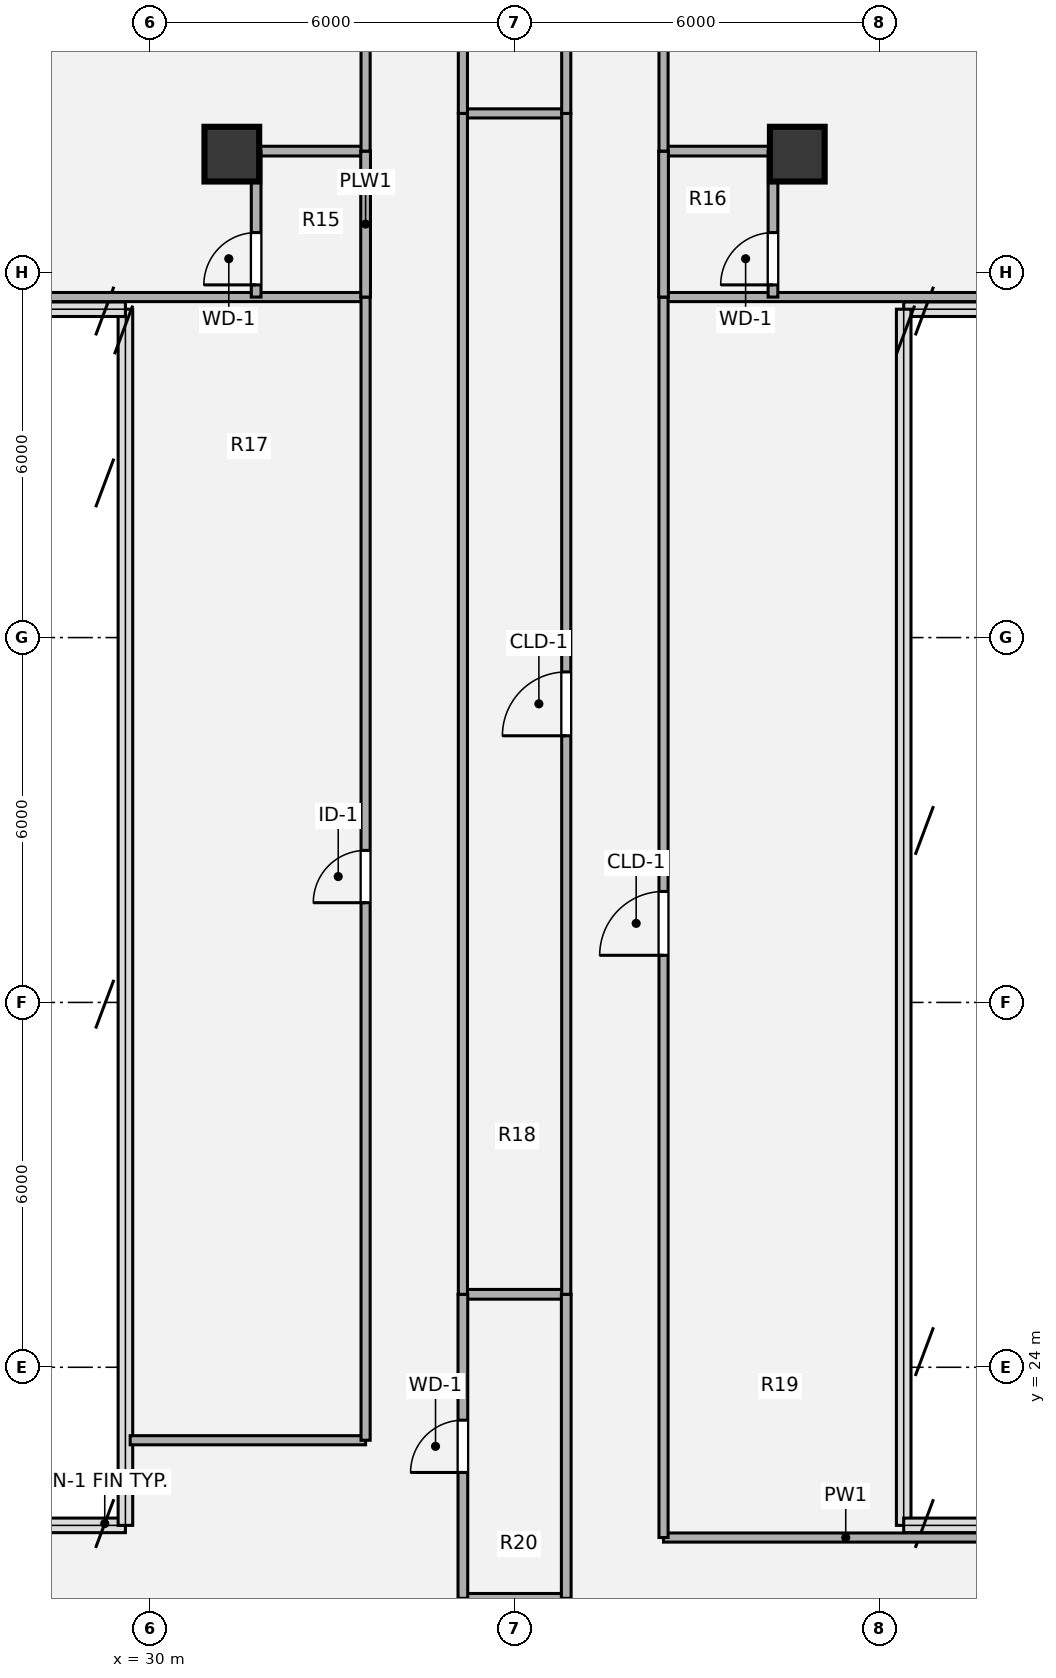
"""IFC4 building model, lengths in metres.
Left out: names, types, materials, properties, quantities, classifications, styles, units other than length and angle.
Written with IfcOpenShell. Run it as: python <this file> out.ifc"""

import sys

from ifc_helpers import new_model, si_unit, direction, frame, frame_2d, origin, origin_2d, place, context, subcontext, project, spatial, rectangle, hollow_circle, extrude, source, transform, mapped, element, fill, save


model = new_model("IFC4")
c1 = context("Model", 3, precision=1e-05, world=origin(), true_north=direction((0.0, 1.0)))
c2 = subcontext(c1, "Body", "Model", "MODEL_VIEW")
j1 = project(units=[si_unit("LENGTHUNIT", "METRE"), si_unit("PLANEANGLEUNIT", "RADIAN")], contexts=[c1])
p1 = place(None, origin())
s1 = spatial("IfcSite", under=j1, at=p1, CompositionType="ELEMENT")
p2 = place(p1, origin())
s2 = spatial("IfcBuilding", under=s1, at=p2, CompositionType="ELEMENT")
p3 = place(p2, frame((0.0, 0.0, 272.16)))
s3 = spatial("IfcBuildingStorey", under=s2, at=p3, CompositionType="ELEMENT", Elevation=272.16)
m1 = source(origin(), c2, "Body", "SweptSolid", [
    extrude(hollow_circle(Radius=0.45, WallThickness=0.032, at=origin_2d()), origin(), (0.0, 0.0, 1.0), 3.78),
])
for number, where, z_axis, x_axis in (
    (1, (31.35, 43.95, 0.0), (0.0, 0.0, 1.0), (1.0, 0.0, 0.0)),
    (2, (40.65, 43.95, 0.0), (0.0, 0.0, 1.0), (1.0, 0.0, 0.0)),
):
    element("IfcColumn", number, at=place(p3, frame(where, z_axis=z_axis, x_axis=x_axis)), inside=s3, PredefinedType="COLUMN", context=c2, shape_type="MappedRepresentation", body=[
        mapped(m1, transform((0.0, 0.0, 0.0), x_axis=(1.0, 0.0, 0.0), y_axis=(0.0, 1.0, 0.0), z_axis=(0.0, 0.0, 1.0), scale=1.0)),
    ])
p4 = place(p3, frame((35.15, 20.2, 0.0), z_axis=(0.0, 0.0, 1.0), x_axis=(1.0, 0.0, 0.0)))
e3 = element("IfcWall", 3, at=p4, inside=s3, PredefinedType="PLUMBINGWALL", context=c2, shape_type="SweptSolid", body=[
    extrude(rectangle(XDim=1.7, YDim=0.16, at=frame_2d((0.85, 0.0))), origin(), (0.0, 0.0, 1.0), 3.5),
])
p5 = place(p3, frame((38.45, 21.2, 0.0), z_axis=(0.0, 0.0, 1.0), x_axis=(1.0, 0.0, 0.0)))
e4 = element("IfcWall", 4, at=p5, inside=s3, PredefinedType="PARTITIONING", context=c2, shape_type="SweptSolid", body=[
    extrude(rectangle(XDim=5.993, YDim=0.15, at=frame_2d((2.997, 0.0))), origin(), (0.0, 0.0, 1.0), 3.5),
])
p6 = place(p3, frame((29.678, 22.8, 0.0), z_axis=(0.0, 0.0, 1.0), x_axis=(1.0, 0.0, 0.0)))
e5 = element("IfcWall", 5, at=p6, inside=s3, PredefinedType="PARTITIONING", context=c2, shape_type="SweptSolid", body=[
    extrude(rectangle(XDim=3.872, YDim=0.15, at=frame_2d((1.936, 0.0))), origin(), (0.0, 0.0, 1.0), 3.5),
])
p7 = place(p3, frame((35.15, 25.2, 0.0), z_axis=(0.0, 0.0, 1.0), x_axis=(1.0, 0.0, 0.0)))
e6 = element("IfcWall", 6, at=p7, inside=s3, PredefinedType="PLUMBINGWALL", context=c2, shape_type="SweptSolid", body=[
    extrude(rectangle(XDim=1.7, YDim=0.16, at=frame_2d((0.85, 0.0))), origin(), (0.0, 0.0, 1.0), 3.5),
])
p8 = place(p3, frame((27.558, 41.6, 0.0), z_axis=(0.0, 0.0, 1.0), x_axis=(1.0, 0.0, 0.0)))
e7 = element("IfcWall", 7, at=p8, inside=s3, PredefinedType="PARTITIONING", context=c2, shape_type="SweptSolid", body=[
    extrude(rectangle(XDim=5.992, YDim=0.15, at=frame_2d((2.996, 0.0))), origin(), (0.0, 0.0, 1.0), 3.5),
])
p9 = place(p3, frame((38.45, 41.6, 0.0), z_axis=(0.0, 0.0, 1.0), x_axis=(1.0, 0.0, 0.0)))
e8 = element("IfcWall", 8, at=p9, inside=s3, PredefinedType="PARTITIONING", context=c2, shape_type="SweptSolid", body=[
    extrude(rectangle(XDim=5.993, YDim=0.15, at=frame_2d((2.997, 0.0))), origin(), (0.0, 0.0, 1.0), 3.5),
])
for number, where, z_axis, x_axis in (
    (9, (31.75, 44.0, 0.0), (0.0, 0.0, 1.0), (1.0, 0.0, 0.0)),
    (10, (38.45, 44.0, 0.0), (0.0, 0.0, 1.0), (1.0, 0.0, 0.0)),
):
    element("IfcWall", number, at=place(p3, frame(where, z_axis=z_axis, x_axis=x_axis)), inside=s3, PredefinedType="PLUMBINGWALL", context=c2, shape_type="SweptSolid", body=[
        extrude(rectangle(XDim=1.8, YDim=0.16, at=frame_2d((0.9, 0.0))), origin(), (0.0, 0.0, 1.0), 2.903),
    ])
p10 = place(p3, frame((35.15, 44.62, 0.0), z_axis=(0.0, 0.0, 1.0), x_axis=(1.0, 0.0, 0.0)))
e11 = element("IfcWall", 11, at=p10, inside=s3, PredefinedType="PARTITIONING", context=c2, shape_type="SweptSolid", body=[
    extrude(rectangle(XDim=1.7, YDim=0.15, at=frame_2d((0.85, 0.0))), origin(), (0.0, 0.0, 1.0), 3.259),
])
p11 = place(p3, frame((31.75, 41.6, 0.0), z_axis=(0.0, 0.0, 1.0), x_axis=(0.0, 1.0, 0.0)))
e12 = element("IfcWall", 12, at=p11, inside=s3, PredefinedType="PLUMBINGWALL", context=c2, shape_type="SweptSolid", body=[
    extrude(rectangle(XDim=2.4, YDim=0.16, at=frame_2d((1.2, 0.0))), origin(), (0.0, 0.0, 1.0), 3.5),
])
p12 = place(p11, frame((0.2, 0.0, 0.0)))
e13 = element("IfcOpeningElement", 13, at=p12, cuts=e12, PredefinedType="OPENING", context=c2, shape_type="SweptSolid", body=[
    extrude(rectangle(XDim=0.86, YDim=2.1, at=origin_2d()), frame((0.43, 0.09, 1.05), z_axis=(0.0, -1.0, 0.0), x_axis=(1.0, 0.0, 0.0)), (0.0, 0.0, 1.0), 0.18),
])
p13 = place(p3, frame((33.55, 22.8, 0.0), z_axis=(0.0, 0.0, 1.0), x_axis=(0.0, 1.0, 0.0)))
e14 = element("IfcWall", 14, at=p13, inside=s3, PredefinedType="PARTITIONING", context=c2, shape_type="SweptSolid", body=[
    extrude(rectangle(XDim=18.8, YDim=0.15, at=frame_2d((9.4, 0.0))), origin(), (0.0, 0.0, 1.0), 3.5),
])
p14 = place(p13, frame((8.84, 0.0, 0.0)))
e15 = element("IfcOpeningElement", 15, at=p14, cuts=e14, PredefinedType="OPENING", context=c2, shape_type="SweptSolid", body=[
    extrude(rectangle(XDim=0.86, YDim=2.1, at=origin_2d()), frame((0.43, 0.085, 1.05), z_axis=(0.0, -1.0, 0.0), x_axis=(1.0, 0.0, 0.0)), (0.0, 0.0, 1.0), 0.17),
])
p15 = place(p3, frame((33.55, 41.6, 0.0), z_axis=(0.0, 0.0, 1.0), x_axis=(0.0, 1.0, 0.0)))
e16 = element("IfcWall", 16, at=p15, inside=s3, PredefinedType="PLUMBINGWALL", context=c2, shape_type="SweptSolid", body=[
    extrude(rectangle(XDim=2.4, YDim=0.16, at=frame_2d((1.2, 0.0))), origin(), (0.0, 0.0, 1.0), 3.5),
])
p16 = place(p3, frame((33.55, 44.0, 0.0), z_axis=(0.0, 0.0, 1.0), x_axis=(0.0, 1.0, 0.0)))
e17 = element("IfcWall", 17, at=p16, inside=s3, PredefinedType="PARTITIONING", context=c2, shape_type="SweptSolid", body=[
    extrude(rectangle(XDim=5.64, YDim=0.15, at=frame_2d((2.82, 0.0))), origin(), (0.0, 0.0, 1.0), 3.5),
])
p17 = place(p16, frame((2.36, 0.0, 0.0)))
e18 = element("IfcOpeningElement", 18, at=p17, cuts=e17, PredefinedType="OPENING", context=c2, shape_type="SweptSolid", body=[
    extrude(rectangle(XDim=0.92, YDim=2.1, at=origin_2d()), frame((0.46, 0.085, 1.05), z_axis=(0.0, -1.0, 0.0), x_axis=(1.0, 0.0, 0.0)), (0.0, 0.0, 1.0), 0.17),
])
p18 = place(p3, frame((35.15, 20.2, 0.0), z_axis=(0.0, 0.0, 1.0), x_axis=(0.0, 1.0, 0.0)))
e19 = element("IfcWall", 19, at=p18, inside=s3, PredefinedType="PLUMBINGWALL", context=c2, shape_type="SweptSolid", body=[
    extrude(rectangle(XDim=5.0, YDim=0.16, at=frame_2d((2.5, 0.0))), origin(), (0.0, 0.0, 1.0), 3.5),
])
p19 = place(p18, frame((2.07, 0.0, 0.0)))
e20 = element("IfcOpeningElement", 20, at=p19, cuts=e19, PredefinedType="OPENING", context=c2, shape_type="SweptSolid", body=[
    extrude(rectangle(XDim=0.86, YDim=2.1, at=origin_2d()), frame((0.43, 0.09, 1.05), z_axis=(0.0, -1.0, 0.0), x_axis=(1.0, 0.0, 0.0)), (0.0, 0.0, 1.0), 0.18),
])
p20 = place(p3, frame((35.15, 25.2, 0.0), z_axis=(0.0, 0.0, 1.0), x_axis=(0.0, 1.0, 0.0)))
e21 = element("IfcWall", 21, at=p20, inside=s3, PredefinedType="PARTITIONING", context=c2, shape_type="SweptSolid", body=[
    extrude(rectangle(XDim=19.42, YDim=0.15, at=frame_2d((9.71, 0.0))), origin(), (0.0, 0.0, 1.0), 3.5),
])
p21 = place(p3, frame((35.15, 44.62, 0.0), z_axis=(0.0, 0.0, 1.0), x_axis=(0.0, 1.0, 0.0)))
e22 = element("IfcWall", 22, at=p21, inside=s3, PredefinedType="PARTITIONING", context=c2, shape_type="SweptSolid", body=[
    extrude(rectangle(XDim=12.58, YDim=0.15, at=frame_2d((6.29, 0.0))), origin(), (0.0, 0.0, 1.0), 3.5),
])
p22 = place(p21, frame((5.83, 0.0, 0.0)))
e23 = element("IfcOpeningElement", 23, at=p22, cuts=e22, PredefinedType="OPENING", context=c2, shape_type="SweptSolid", body=[
    extrude(rectangle(XDim=0.86, YDim=2.1, at=origin_2d()), frame((0.43, 0.085, 1.05), z_axis=(0.0, -1.0, 0.0), x_axis=(1.0, 0.0, 0.0)), (0.0, 0.0, 1.0), 0.17),
])
p23 = place(p3, frame((36.85, 20.2, 0.0), z_axis=(0.0, 0.0, 1.0), x_axis=(0.0, 1.0, 0.0)))
e24 = element("IfcWall", 24, at=p23, inside=s3, PredefinedType="PLUMBINGWALL", context=c2, shape_type="SweptSolid", body=[
    extrude(rectangle(XDim=5.0, YDim=0.16, at=frame_2d((2.5, 0.0))), origin(), (0.0, 0.0, 1.0), 3.5),
])
p24 = place(p3, frame((36.85, 25.2, 0.0), z_axis=(0.0, 0.0, 1.0), x_axis=(0.0, 1.0, 0.0)))
e25 = element("IfcWall", 25, at=p24, inside=s3, PredefinedType="PARTITIONING", context=c2, shape_type="SweptSolid", body=[
    extrude(rectangle(XDim=19.42, YDim=0.15, at=frame_2d((9.71, 0.0))), origin(), (0.0, 0.0, 1.0), 3.5),
])
p25 = place(p24, frame((9.185, 0.0, 0.0)))
e26 = element("IfcOpeningElement", 26, at=p25, cuts=e25, PredefinedType="OPENING", context=c2, shape_type="SweptSolid", body=[
    extrude(rectangle(XDim=1.05, YDim=2.1, at=origin_2d()), frame((0.525, 0.085, 1.05), z_axis=(0.0, -1.0, 0.0), x_axis=(1.0, 0.0, 0.0)), (0.0, 0.0, 1.0), 0.17),
])
p26 = place(p3, frame((36.85, 44.62, 0.0), z_axis=(0.0, 0.0, 1.0), x_axis=(0.0, 1.0, 0.0)))
e27 = element("IfcWall", 27, at=p26, inside=s3, PredefinedType="PARTITIONING", context=c2, shape_type="SweptSolid", body=[
    extrude(rectangle(XDim=12.58, YDim=0.15, at=frame_2d((6.29, 0.0))), origin(), (0.0, 0.0, 1.0), 3.5),
])
p27 = place(p3, frame((38.45, 21.2, 0.0), z_axis=(0.0, 0.0, 1.0), x_axis=(0.0, 1.0, 0.0)))
e28 = element("IfcWall", 28, at=p27, inside=s3, PredefinedType="PARTITIONING", context=c2, shape_type="SweptSolid", body=[
    extrude(rectangle(XDim=20.4, YDim=0.15, at=frame_2d((10.2, 0.0))), origin(), (0.0, 0.0, 1.0), 3.5),
])
p28 = place(p27, frame((9.575, 0.0, 0.0)))
e29 = element("IfcOpeningElement", 29, at=p28, cuts=e28, PredefinedType="OPENING", context=c2, shape_type="SweptSolid", body=[
    extrude(rectangle(XDim=1.05, YDim=2.1, at=origin_2d()), frame((0.525, 0.085, 1.05), z_axis=(0.0, -1.0, 0.0), x_axis=(1.0, 0.0, 0.0)), (0.0, 0.0, 1.0), 0.17),
])
p29 = place(p3, frame((38.45, 41.6, 0.0), z_axis=(0.0, 0.0, 1.0), x_axis=(0.0, 1.0, 0.0)))
e30 = element("IfcWall", 30, at=p29, inside=s3, PredefinedType="PLUMBINGWALL", context=c2, shape_type="SweptSolid", body=[
    extrude(rectangle(XDim=2.4, YDim=0.16, at=frame_2d((1.2, 0.0))), origin(), (0.0, 0.0, 1.0), 3.5),
])
p30 = place(p3, frame((38.45, 44.0, 0.0), z_axis=(0.0, 0.0, 1.0), x_axis=(0.0, 1.0, 0.0)))
e31 = element("IfcWall", 31, at=p30, inside=s3, PredefinedType="PARTITIONING", context=c2, shape_type="SweptSolid", body=[
    extrude(rectangle(XDim=5.64, YDim=0.15, at=frame_2d((2.82, 0.0))), origin(), (0.0, 0.0, 1.0), 3.5),
])
p31 = place(p30, frame((2.36, 0.0, 0.0)))
e32 = element("IfcOpeningElement", 32, at=p31, cuts=e31, PredefinedType="OPENING", context=c2, shape_type="SweptSolid", body=[
    extrude(rectangle(XDim=0.92, YDim=2.1, at=origin_2d()), frame((0.46, 0.085, 1.05), z_axis=(0.0, -1.0, 0.0), x_axis=(1.0, 0.0, 0.0)), (0.0, 0.0, 1.0), 0.17),
])
p32 = place(p3, frame((40.25, 41.6, 0.0), z_axis=(0.0, 0.0, 1.0), x_axis=(0.0, 1.0, 0.0)))
e33 = element("IfcWall", 33, at=p32, inside=s3, PredefinedType="PLUMBINGWALL", context=c2, shape_type="SweptSolid", body=[
    extrude(rectangle(XDim=2.4, YDim=0.16, at=frame_2d((1.2, 0.0))), origin(), (0.0, 0.0, 1.0), 3.5),
])
p33 = place(p32, frame((0.2, 0.0, 0.0)))
e34 = element("IfcOpeningElement", 34, at=p33, cuts=e33, PredefinedType="OPENING", context=c2, shape_type="SweptSolid", body=[
    extrude(rectangle(XDim=0.86, YDim=2.1, at=origin_2d()), frame((0.43, 0.09, 1.05), z_axis=(0.0, -1.0, 0.0), x_axis=(1.0, 0.0, 0.0)), (0.0, 0.0, 1.0), 0.18),
])
m2 = source(origin(), c2, "Body", "SweptSolid", [
    extrude(rectangle(XDim=0.86, YDim=2.1, at=origin_2d()), frame((0.43, 0.025, 1.05), z_axis=(0.0, -1.0, 0.0), x_axis=(1.0, 0.0, 0.0)), (0.0, 0.0, 1.0), 0.05),
])
p34 = place(p12, origin())
e35 = element("IfcDoor", 35, at=p34, inside=s3, OperationType="SINGLE_SWING_LEFT", PredefinedType="DOOR", context=c2, shape_type="MappedRepresentation", body=[
    mapped(m2, transform((0.0, 0.0, 0.0), x_axis=(1.0, 0.0, 0.0), y_axis=(0.0, 1.0, 0.0), z_axis=(0.0, 0.0, 1.0), scale=1.0)),
])
fill(e13, e35)
m3 = source(origin(), c2, "Body", "SweptSolid", [
    extrude(rectangle(XDim=0.86, YDim=2.1, at=origin_2d()), frame((0.43, 0.025, 1.05), z_axis=(0.0, -1.0, 0.0), x_axis=(1.0, 0.0, 0.0)), (0.0, 0.0, 1.0), 0.05),
])
p35 = place(p14, origin())
e36 = element("IfcDoor", 36, at=p35, inside=s3, OperationType="SINGLE_SWING_LEFT", PredefinedType="DOOR", context=c2, shape_type="MappedRepresentation", body=[
    mapped(m3, transform((0.0, 0.0, 0.0), x_axis=(1.0, 0.0, 0.0), y_axis=(0.0, 1.0, 0.0), z_axis=(0.0, 0.0, 1.0), scale=1.0)),
])
fill(e15, e36)
p36 = place(p19, origin())
e37 = element("IfcDoor", 37, at=p36, inside=s3, OperationType="SINGLE_SWING_LEFT", PredefinedType="DOOR", context=c2, shape_type="MappedRepresentation", body=[
    mapped(m2, transform((0.0, 0.0, 0.0), x_axis=(1.0, 0.0, 0.0), y_axis=(0.0, 1.0, 0.0), z_axis=(0.0, 0.0, 1.0), scale=1.0)),
])
fill(e20, e37)
m4 = source(origin(), c2, "Body", "SweptSolid", [
    extrude(rectangle(XDim=1.05, YDim=2.1, at=origin_2d()), frame((0.525, 0.025, 1.05), z_axis=(0.0, -1.0, 0.0), x_axis=(1.0, 0.0, 0.0)), (0.0, 0.0, 1.0), 0.05),
])
p37 = place(p25, origin())
e38 = element("IfcDoor", 38, at=p37, inside=s3, OperationType="SINGLE_SWING_LEFT", PredefinedType="DOOR", context=c2, shape_type="MappedRepresentation", body=[
    mapped(m4, transform((0.0, 0.0, 0.0), x_axis=(1.0, 0.0, 0.0), y_axis=(0.0, 1.0, 0.0), z_axis=(0.0, 0.0, 1.0), scale=1.0)),
])
fill(e26, e38)
p38 = place(p28, origin())
e39 = element("IfcDoor", 39, at=p38, inside=s3, OperationType="SINGLE_SWING_LEFT", PredefinedType="DOOR", context=c2, shape_type="MappedRepresentation", body=[
    mapped(m4, transform((0.0, 0.0, 0.0), x_axis=(1.0, 0.0, 0.0), y_axis=(0.0, 1.0, 0.0), z_axis=(0.0, 0.0, 1.0), scale=1.0)),
])
fill(e29, e39)
p39 = place(p33, origin())
e40 = element("IfcDoor", 40, at=p39, inside=s3, OperationType="SINGLE_SWING_LEFT", PredefinedType="DOOR", context=c2, shape_type="MappedRepresentation", body=[
    mapped(m2, transform((0.0, 0.0, 0.0), x_axis=(1.0, 0.0, 0.0), y_axis=(0.0, 1.0, 0.0), z_axis=(0.0, 0.0, 1.0), scale=1.0)),
])
fill(e34, e40)
save(model, sys.argv[1])
